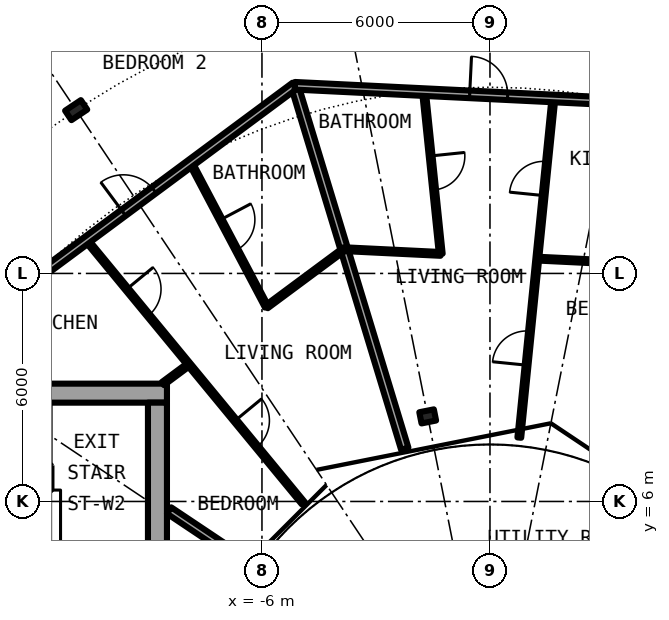
"""IFC4 building model, lengths in metres.
Left out: names, types, materials, properties, quantities, classifications, styles, units other than length and angle.
Written with IfcOpenShell. Run it as: python <this file> out.ifc"""

import sys

from ifc_helpers import new_model, si_unit, direction, frame, frame_2d, origin, origin_2d, place, context, subcontext, project, spatial, rectangle, i_section, extrude, element, fill, save


model = new_model("IFC4")
c1 = context("Model", 3, precision=1e-05, world=origin(), true_north=direction((0.0, 1.0)))
c2 = subcontext(c1, "Body", "Model", "MODEL_VIEW")
j1 = project(units=[si_unit("LENGTHUNIT", "METRE"), si_unit("PLANEANGLEUNIT", "RADIAN")], contexts=[c1])
p1 = place(None, origin())
s1 = spatial("IfcSite", under=j1, at=p1, CompositionType="ELEMENT")
p2 = place(p1, origin())
s2 = spatial("IfcBuilding", under=s1, at=p2, CompositionType="ELEMENT")
p3 = place(p2, frame((0.0, 0.0, 170.75)))
s3 = spatial("IfcBuildingStorey", under=s2, at=p3, CompositionType="ELEMENT", Elevation=170.75)
p4 = place(p3, frame((-10.889, 16.297, 0.0), z_axis=(0.0, 0.0, 1.0), x_axis=(-0.55557023302, 0.831469612303, 0.0)))
e1 = element("IfcColumn", 1, at=p4, inside=s3, PredefinedType="COLUMN", context=c2, shape_type="SweptSolid", body=[
    extrude(i_section(OverallWidth=0.3, OverallDepth=0.5, WebThickness=0.014, FlangeThickness=0.028, FilletRadius=0.027, at=origin_2d()), origin(), (0.0, 0.0, 1.0), 3.05),
])
p5 = place(p3, frame((-1.639, 8.239, 0.0), z_axis=(0.0, 0.0, 1.0), x_axis=(-0.195090322016, 0.980785280403, 0.0)))
e2 = element("IfcColumn", 2, at=p5, inside=s3, PredefinedType="COLUMN", context=c2, shape_type="SweptSolid", body=[
    extrude(i_section(OverallWidth=0.3, OverallDepth=0.39, WebThickness=0.011, FlangeThickness=0.019, FilletRadius=0.027, at=origin_2d()), origin(), (0.0, 0.0, 1.0), 3.05),
])
p6 = place(p3, frame((-8.5, 8.85, 0.0), z_axis=(0.0, 0.0, 1.0), x_axis=(-1.0, 0.0, 0.0)))
e3 = element("IfcWall", 3, at=p6, inside=s3, PredefinedType="SHEAR", context=c2, shape_type="SweptSolid", body=[
    extrude(rectangle(XDim=13.6, YDim=0.5, at=frame_2d((6.8, 0.0))), origin(), (0.0, 0.0, 1.0), 3.05),
])
p7 = place(p6, frame((11.375, 0.0, 0.0)))
e4 = element("IfcOpeningElement", 4, at=p7, cuts=e3, PredefinedType="OPENING", context=c2, shape_type="SweptSolid", body=[
    extrude(rectangle(XDim=1.2, YDim=2.3, at=frame_2d((0.6, 1.15))), frame((0.0, 0.26, 0.0), z_axis=(0.0, -1.0, 0.0), x_axis=(1.0, 0.0, 0.0)), (0.0, 0.0, 1.0), 0.52),
])
p8 = place(p3, frame((-8.75, 8.6, 0.0), z_axis=(0.0, 0.0, 1.0), x_axis=(0.0, -1.0, 0.0)))
e5 = element("IfcWall", 5, at=p8, inside=s3, PredefinedType="SHEAR", context=c2, shape_type="SweptSolid", body=[
    extrude(rectangle(XDim=17.2, YDim=0.5, at=frame_2d((8.6, 0.0))), origin(), (0.0, 0.0, 1.0), 3.05),
])
p9 = place(p8, frame((7.4, 0.0, 0.1)))
e6 = element("IfcOpeningElement", 6, at=p9, cuts=e5, PredefinedType="OPENING", context=c2, shape_type="SweptSolid", body=[
    extrude(rectangle(XDim=2.4, YDim=2.2, at=frame_2d((1.2, 1.1))), frame((0.0, 0.26, 0.0), z_axis=(0.0, -1.0, 0.0), x_axis=(1.0, 0.0, 0.0)), (0.0, 0.0, 1.0), 0.52),
])
p10 = place(p3, frame((-10.616, 12.875, 0.0), z_axis=(0.0, 0.0, 1.0), x_axis=(0.636045954217, -0.771651180342, 0.0)))
e7 = element("IfcWall", 7, at=p10, inside=s3, PredefinedType="PARTITIONING", context=c2, shape_type="SweptSolid", body=[
    extrude(rectangle(XDim=8.968, YDim=0.1, at=frame_2d((4.484, 0.0))), origin(), (0.0, 0.0, 1.0), 2.7),
])
p11 = place(p10, frame((1.667, 0.0, 0.0)))
e8 = element("IfcOpeningElement", 8, at=p11, cuts=e7, PredefinedType="OPENING", context=c2, shape_type="SweptSolid", body=[
    extrude(rectangle(XDim=0.9, YDim=2.3, at=frame_2d((0.45, 1.15))), frame((0.0, 0.06, 0.0), z_axis=(0.0, -1.0, 0.0), x_axis=(1.0, 0.0, 0.0)), (0.0, 0.0, 1.0), 0.12),
])
p12 = place(p10, frame((6.151, 0.0, 0.0)))
e9 = element("IfcOpeningElement", 9, at=p12, cuts=e7, PredefinedType="OPENING", context=c2, shape_type="SweptSolid", body=[
    extrude(rectangle(XDim=0.9, YDim=2.3, at=frame_2d((0.45, 1.15))), frame((0.0, 0.06, 0.0), z_axis=(0.0, -1.0, 0.0), x_axis=(1.0, 0.0, 0.0)), (0.0, 0.0, 1.0), 0.12),
])
p13 = place(p3, frame((-7.875, 14.908, 0.0), z_axis=(0.0, 0.0, 1.0), x_axis=(0.467030118529, -0.884241408432, 0.0)))
e10 = element("IfcWall", 10, at=p13, inside=s3, PredefinedType="PARTITIONING", context=c2, shape_type="SweptSolid", body=[
    extrude(rectangle(XDim=4.278, YDim=0.1, at=frame_2d((2.139, 0.0))), origin(), (0.0, 0.0, 1.0), 2.7),
])
p14 = place(p13, frame((1.689, 0.0, 0.0)))
e11 = element("IfcOpeningElement", 11, at=p14, cuts=e10, PredefinedType="OPENING", context=c2, shape_type="SweptSolid", body=[
    extrude(rectangle(XDim=0.9, YDim=2.3, at=frame_2d((0.45, 1.15))), frame((0.0, 0.06, 0.0), z_axis=(0.0, -1.0, 0.0), x_axis=(1.0, 0.0, 0.0)), (0.0, 0.0, 1.0), 0.12),
])
p15 = place(p3, frame((-5.14, 16.937, 0.0), z_axis=(0.0, 0.0, 1.0), x_axis=(0.290401199794, -0.956904981259, 0.0)))
e12 = element("IfcWall", 12, at=p15, inside=s3, PredefinedType="PARTITIONING", context=c2, shape_type="SweptSolid", body=[
    extrude(rectangle(XDim=9.979, YDim=0.2, at=frame_2d((4.99, 0.0))), origin(), (0.0, 0.0, 1.0), 2.7),
])
p16 = place(p3, frame((-1.735, 16.771, 0.0), z_axis=(0.0, 0.0, 1.0), x_axis=(0.102875790791, -0.994694210131, 0.0)))
e13 = element("IfcWall", 13, at=p16, inside=s3, PredefinedType="PARTITIONING", context=c2, shape_type="SweptSolid", body=[
    extrude(rectangle(XDim=4.279, YDim=0.1, at=frame_2d((2.139, 0.0))), origin(), (0.0, 0.0, 1.0), 2.7),
])
p17 = place(p16, frame((1.689, 0.0, 0.0)))
e14 = element("IfcOpeningElement", 14, at=p17, cuts=e13, PredefinedType="OPENING", context=c2, shape_type="SweptSolid", body=[
    extrude(rectangle(XDim=0.9, YDim=2.3, at=frame_2d((0.45, 1.15))), frame((0.0, 0.06, 0.0), z_axis=(0.0, -1.0, 0.0), x_axis=(1.0, 0.0, 0.0)), (0.0, 0.0, 1.0), 0.12),
])
p18 = place(p3, frame((0.772, 7.681, 0.0), z_axis=(0.0, 0.0, 1.0), x_axis=(0.100029361081, 0.994984485769, 0.0)))
e15 = element("IfcWall", 15, at=p18, inside=s3, PredefinedType="PARTITIONING", context=c2, shape_type="SweptSolid", body=[
    extrude(rectangle(XDim=8.967, YDim=0.1, at=frame_2d((4.483, 0.0))), origin(), (0.0, 0.0, 1.0), 2.7),
])
p19 = place(p18, frame((6.4, 0.0, 0.0)))
e16 = element("IfcOpeningElement", 16, at=p19, cuts=e15, PredefinedType="OPENING", context=c2, shape_type="SweptSolid", body=[
    extrude(rectangle(XDim=0.9, YDim=2.3, at=frame_2d((0.45, 1.15))), frame((0.0, 0.06, 0.0), z_axis=(0.0, -1.0, 0.0), x_axis=(1.0, 0.0, 0.0)), (0.0, 0.0, 1.0), 0.12),
])
p20 = place(p18, frame((1.915, 0.0, 0.0)))
e17 = element("IfcOpeningElement", 17, at=p20, cuts=e15, PredefinedType="OPENING", context=c2, shape_type="SweptSolid", body=[
    extrude(rectangle(XDim=0.9, YDim=2.3, at=frame_2d((0.45, 1.15))), frame((0.0, 0.06, 0.0), z_axis=(0.0, -1.0, 0.0), x_axis=(1.0, 0.0, 0.0)), (0.0, 0.0, 1.0), 0.12),
])
p21 = place(p3, frame((-6.513, 4.472, 0.0), z_axis=(0.0, 0.0, 1.0), x_axis=(-0.83133816625, 0.555766905579, 0.0)))
e18 = element("IfcWall", 18, at=p21, inside=s3, PredefinedType="PARTITIONING", context=c2, shape_type="SweptSolid", body=[
    extrude(rectangle(XDim=2.323, YDim=0.2, at=frame_2d((1.162, 0.0))), origin(), (0.0, 0.0, 1.0), 2.7),
])
p22 = place(p3, frame((-8.607, 9.1, 0.0), z_axis=(0.0, 0.0, 1.0), x_axis=(0.803199066515, 0.595710718007, 0.0)))
e19 = element("IfcWall", 19, at=p22, inside=s3, PredefinedType="PARTITIONING", context=c2, shape_type="SweptSolid", body=[
    extrude(rectangle(XDim=0.858, YDim=0.1, at=frame_2d((0.429, 0.0))), origin(), (0.0, 0.0, 1.0), 2.7),
])
p23 = place(p3, frame((-5.877, 11.125, 0.0), z_axis=(0.0, 0.0, 1.0), x_axis=(0.803259509791, 0.595629213463, 0.0)))
e20 = element("IfcWall", 20, at=p23, inside=s3, PredefinedType="PARTITIONING", context=c2, shape_type="SweptSolid", body=[
    extrude(rectangle(XDim=2.543, YDim=0.1, at=frame_2d((1.272, 0.0))), origin(), (0.0, 0.0, 1.0), 2.7),
])
p24 = place(p3, frame((-3.839, 12.638, 0.0), z_axis=(0.0, 0.0, 1.0), x_axis=(0.99880915717, -0.048787985754, 0.0)))
e21 = element("IfcWall", 21, at=p24, inside=s3, PredefinedType="PARTITIONING", context=c2, shape_type="SweptSolid", body=[
    extrude(rectangle(XDim=2.542, YDim=0.1, at=frame_2d((1.271, 0.0))), origin(), (0.0, 0.0, 1.0), 2.7),
])
p25 = place(p3, frame((1.24, 12.39, 0.0), z_axis=(0.0, 0.0, 1.0), x_axis=(0.998816217325, -0.048643231882, 0.0)))
e22 = element("IfcWall", 22, at=p25, inside=s3, PredefinedType="PARTITIONING", context=c2, shape_type="SweptSolid", body=[
    extrude(rectangle(XDim=3.82, YDim=0.1, at=frame_2d((1.91, 0.0))), origin(), (0.0, 0.0, 1.0), 2.7),
])
p26 = place(p3, frame((-13.349, 10.848, 0.0), z_axis=(0.0, 0.0, 1.0), x_axis=(0.803229232922, 0.595670042371, 0.0)))
e23 = element("IfcWall", 23, at=p26, inside=s3, PredefinedType="PARTITIONING", context=c2, shape_type="SweptSolid", body=[
    extrude(rectangle(XDim=10.224, YDim=0.2, at=frame_2d((5.112, 0.0))), origin(), (0.0, 0.0, 1.0), 2.7),
])
p27 = place(p26, frame((4.612, 0.0, 0.0)))
e24 = element("IfcOpeningElement", 24, at=p27, cuts=e23, PredefinedType="OPENING", context=c2, shape_type="SweptSolid", body=[
    extrude(rectangle(XDim=1.0, YDim=2.3, at=frame_2d((0.5, 1.15))), frame((0.0, 0.11, 0.0), z_axis=(0.0, -1.0, 0.0), x_axis=(1.0, 0.0, 0.0)), (0.0, 0.0, 1.0), 0.22),
])
p28 = place(p3, frame((-5.137, 16.938, 0.0), z_axis=(0.0, 0.0, 1.0), x_axis=(0.99879704719, -0.04903527836, 0.0)))
e25 = element("IfcWall", 25, at=p28, inside=s3, PredefinedType="PARTITIONING", context=c2, shape_type="SweptSolid", body=[
    extrude(rectangle(XDim=11.929, YDim=0.2, at=frame_2d((5.965, 0.0))), origin(), (0.0, 0.0, 1.0), 2.7),
])
p29 = place(p28, frame((4.608, 0.0, 0.0)))
e26 = element("IfcOpeningElement", 26, at=p29, cuts=e25, PredefinedType="OPENING", context=c2, shape_type="SweptSolid", body=[
    extrude(rectangle(XDim=1.0, YDim=2.3, at=frame_2d((0.5, 1.15))), frame((0.0, 0.11, 0.0), z_axis=(0.0, -1.0, 0.0), x_axis=(1.0, 0.0, 0.0)), (0.0, 0.0, 1.0), 0.22),
])
p30 = place(p29, origin())
e27 = element("IfcDoor", 27, at=p30, inside=s3, OperationType="SINGLE_SWING_LEFT", PredefinedType="DOOR", context=c2, shape_type="SweptSolid", body=[
    extrude(rectangle(XDim=1.0, YDim=2.3, at=frame_2d((0.5, 1.15))), frame((0.0, 0.025, 0.0), z_axis=(0.0, -1.0, 0.0), x_axis=(1.0, 0.0, 0.0)), (0.0, 0.0, 1.0), 0.05),
])
fill(e26, e27)
p31 = place(p17, origin())
e28 = element("IfcDoor", 28, at=p31, inside=s3, OperationType="SINGLE_SWING_LEFT", PredefinedType="DOOR", context=c2, shape_type="SweptSolid", body=[
    extrude(rectangle(XDim=0.9, YDim=2.3, at=frame_2d((0.45, 1.15))), frame((0.0, 0.025, 0.0), z_axis=(0.0, -1.0, 0.0), x_axis=(1.0, 0.0, 0.0)), (0.0, 0.0, 1.0), 0.05),
])
fill(e14, e28)
p32 = place(p19, origin())
e29 = element("IfcDoor", 29, at=p32, inside=s3, OperationType="SINGLE_SWING_RIGHT", PredefinedType="DOOR", context=c2, shape_type="SweptSolid", body=[
    extrude(rectangle(XDim=0.9, YDim=2.3, at=frame_2d((0.45, 1.15))), frame((0.0, 0.025, 0.0), z_axis=(0.0, -1.0, 0.0), x_axis=(1.0, 0.0, 0.0)), (0.0, 0.0, 1.0), 0.05),
])
fill(e16, e29)
p33 = place(p20, origin())
e30 = element("IfcDoor", 30, at=p33, inside=s3, OperationType="SINGLE_SWING_LEFT", PredefinedType="DOOR", context=c2, shape_type="SweptSolid", body=[
    extrude(rectangle(XDim=0.9, YDim=2.3, at=frame_2d((0.45, 1.15))), frame((0.0, 0.025, 0.0), z_axis=(0.0, -1.0, 0.0), x_axis=(1.0, 0.0, 0.0)), (0.0, 0.0, 1.0), 0.05),
])
fill(e17, e30)
p34 = place(p27, origin())
e31 = element("IfcDoor", 31, at=p34, inside=s3, OperationType="SINGLE_SWING_LEFT", PredefinedType="DOOR", context=c2, shape_type="SweptSolid", body=[
    extrude(rectangle(XDim=1.0, YDim=2.3, at=frame_2d((0.5, 1.15))), frame((0.0, 0.025, 0.0), z_axis=(0.0, -1.0, 0.0), x_axis=(1.0, 0.0, 0.0)), (0.0, 0.0, 1.0), 0.05),
])
fill(e24, e31)
p35 = place(p14, origin())
e32 = element("IfcDoor", 32, at=p35, inside=s3, OperationType="SINGLE_SWING_RIGHT", PredefinedType="DOOR", context=c2, shape_type="SweptSolid", body=[
    extrude(rectangle(XDim=0.9, YDim=2.3, at=frame_2d((0.45, 1.15))), frame((0.0, 0.025, 0.0), z_axis=(0.0, -1.0, 0.0), x_axis=(1.0, 0.0, 0.0)), (0.0, 0.0, 1.0), 0.05),
])
fill(e11, e32)
p36 = place(p11, origin())
e33 = element("IfcDoor", 33, at=p36, inside=s3, OperationType="SINGLE_SWING_LEFT", PredefinedType="DOOR", context=c2, shape_type="SweptSolid", body=[
    extrude(rectangle(XDim=0.9, YDim=2.3, at=frame_2d((0.45, 1.15))), frame((0.0, 0.025, 0.0), z_axis=(0.0, -1.0, 0.0), x_axis=(1.0, 0.0, 0.0)), (0.0, 0.0, 1.0), 0.05),
])
fill(e8, e33)
p37 = place(p12, origin())
e34 = element("IfcDoor", 34, at=p37, inside=s3, OperationType="SINGLE_SWING_RIGHT", PredefinedType="DOOR", context=c2, shape_type="SweptSolid", body=[
    extrude(rectangle(XDim=0.9, YDim=2.3, at=frame_2d((0.45, 1.15))), frame((0.0, 0.025, 0.0), z_axis=(0.0, -1.0, 0.0), x_axis=(1.0, 0.0, 0.0)), (0.0, 0.0, 1.0), 0.05),
])
fill(e9, e34)
save(model, sys.argv[1])
